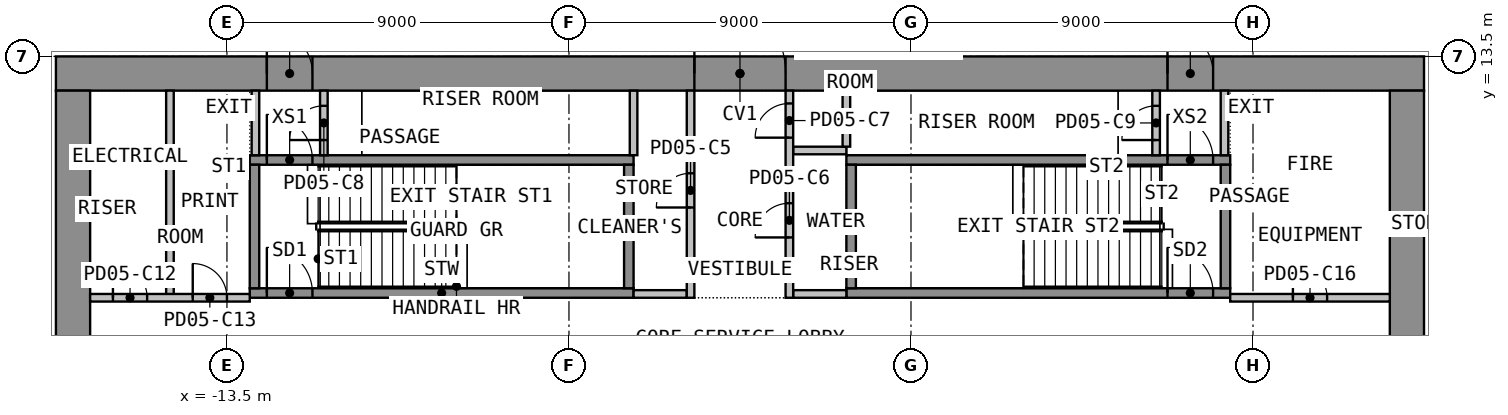
"""IFC4 building model, lengths in metres.
Left out: names, types, materials, properties, quantities, classifications, styles, units other than length and angle.
Written with IfcOpenShell. Run it as: python <this file> out.ifc"""

import sys

from ifc_helpers import new_model, si_unit, direction, frame, frame_2d, origin, place, context, subcontext, project, spatial, rectangle, extrude, element, fill, save


model = new_model("IFC4")
c1 = context("Model", 3, precision=1e-05, world=origin(), true_north=direction((0.0, 1.0)))
c2 = subcontext(c1, "Body", "Model", "MODEL_VIEW")
j1 = project(units=[si_unit("LENGTHUNIT", "METRE"), si_unit("PLANEANGLEUNIT", "RADIAN")], contexts=[c1])
p1 = place(None, origin())
s1 = spatial("IfcSite", under=j1, at=p1, CompositionType="ELEMENT")
p2 = place(p1, origin())
s2 = spatial("IfcBuilding", under=s1, at=p2, CompositionType="ELEMENT")
p3 = place(p2, frame((0.0, 0.0, 25.2)))
s3 = spatial("IfcBuildingStorey", under=s2, at=p3, CompositionType="ELEMENT", Elevation=25.2)
p4 = place(p3, frame((-18.0, 13.05, 0.0), z_axis=(0.0, 0.0, 1.0), x_axis=(1.0, 0.0, 0.0)))
e1 = element("IfcWall", 1, at=p4, inside=s3, PredefinedType="SHEAR", context=c2, shape_type="SweptSolid", body=[
    extrude(rectangle(XDim=36.0, YDim=0.9, at=frame_2d((18.0, 0.0))), origin(), (0.0, 0.0, 1.0), 4.425),
])
p5 = place(p4, frame((16.8, 0.0, 0.0)))
e2 = element("IfcOpeningElement", 2, at=p5, cuts=e1, PredefinedType="OPENING", context=c2, shape_type="SweptSolid", body=[
    extrude(rectangle(XDim=2.4, YDim=2.1, at=frame_2d((1.2, 1.05))), frame((0.0, 0.46, 0.0), z_axis=(0.0, -1.0, 0.0), x_axis=(1.0, 0.0, 0.0)), (0.0, 0.0, 1.0), 0.92),
])
p6 = place(p4, frame((5.55, 0.0, 0.0)))
e3 = element("IfcOpeningElement", 3, at=p6, cuts=e1, PredefinedType="OPENING", context=c2, shape_type="SweptSolid", body=[
    extrude(rectangle(XDim=1.2, YDim=2.1, at=frame_2d((0.6, 1.05))), frame((0.0, 0.46, 0.0), z_axis=(0.0, -1.0, 0.0), x_axis=(1.0, 0.0, 0.0)), (0.0, 0.0, 1.0), 0.92),
])
p7 = place(p4, frame((29.25, 0.0, 0.0)))
e4 = element("IfcOpeningElement", 4, at=p7, cuts=e1, PredefinedType="OPENING", context=c2, shape_type="SweptSolid", body=[
    extrude(rectangle(XDim=1.2, YDim=2.1, at=frame_2d((0.6, 1.05))), frame((0.0, 0.46, 0.0), z_axis=(0.0, -1.0, 0.0), x_axis=(1.0, 0.0, 0.0)), (0.0, 0.0, 1.0), 0.92),
])
p8 = place(p3, frame((-17.55, -12.6, 0.0), z_axis=(0.0, 0.0, 1.0), x_axis=(0.0, 1.0, 0.0)))
e5 = element("IfcWall", 5, at=p8, inside=s3, PredefinedType="SHEAR", context=c2, shape_type="SweptSolid", body=[
    extrude(rectangle(XDim=25.2, YDim=0.9, at=frame_2d((12.6, 0.0))), origin(), (0.0, 0.0, 1.0), 4.425),
])
p9 = place(p8, frame((11.4, 0.0, 0.0)))
e6 = element("IfcOpeningElement", 6, at=p9, cuts=e5, PredefinedType="OPENING", context=c2, shape_type="SweptSolid", body=[
    extrude(rectangle(XDim=2.4, YDim=2.1, at=frame_2d((1.2, 1.05))), frame((0.0, 0.46, 0.0), z_axis=(0.0, -1.0, 0.0), x_axis=(1.0, 0.0, 0.0)), (0.0, 0.0, 1.0), 0.92),
])
p10 = place(p3, frame((17.55, -12.6, 0.0), z_axis=(0.0, 0.0, 1.0), x_axis=(0.0, 1.0, 0.0)))
e7 = element("IfcWall", 7, at=p10, inside=s3, PredefinedType="SHEAR", context=c2, shape_type="SweptSolid", body=[
    extrude(rectangle(XDim=25.2, YDim=0.9, at=frame_2d((12.6, 0.0))), origin(), (0.0, 0.0, 1.0), 4.425),
])
p11 = place(p10, frame((11.4, 0.0, 0.0)))
e8 = element("IfcOpeningElement", 8, at=p11, cuts=e7, PredefinedType="OPENING", context=c2, shape_type="SweptSolid", body=[
    extrude(rectangle(XDim=2.4, YDim=2.1, at=frame_2d((1.2, 1.05))), frame((0.0, 0.46, 0.0), z_axis=(0.0, -1.0, 0.0), x_axis=(1.0, 0.0, 0.0)), (0.0, 0.0, 1.0), 0.92),
])
p12 = place(p3, frame((-12.9, 7.275, 0.0), z_axis=(0.0, 0.0, 1.0), x_axis=(1.0, 0.0, 0.0)))
e9 = element("IfcWall", 9, at=p12, inside=s3, PredefinedType="SHEAR", context=c2, shape_type="SweptSolid", body=[
    extrude(rectangle(XDim=10.1, YDim=0.25, at=frame_2d((5.05, 0.0))), origin(), (0.0, 0.0, 1.0), 4.425),
])
p13 = place(p12, frame((0.45, 0.0, 0.0)))
e10 = element("IfcOpeningElement", 10, at=p13, cuts=e9, PredefinedType="OPENING", context=c2, shape_type="SweptSolid", body=[
    extrude(rectangle(XDim=1.2, YDim=2.1, at=frame_2d((0.6, 1.05))), frame((0.0, 0.135, 0.0), z_axis=(0.0, -1.0, 0.0), x_axis=(1.0, 0.0, 0.0)), (0.0, 0.0, 1.0), 0.27),
])
p14 = place(p3, frame((-12.9, 10.775, 0.0), z_axis=(0.0, 0.0, 1.0), x_axis=(1.0, 0.0, 0.0)))
e11 = element("IfcWall", 11, at=p14, inside=s3, PredefinedType="SHEAR", context=c2, shape_type="SweptSolid", body=[
    extrude(rectangle(XDim=10.1, YDim=0.25, at=frame_2d((5.05, 0.0))), origin(), (0.0, 0.0, 1.0), 4.425),
])
p15 = place(p14, frame((0.45, 0.0, 0.0)))
e12 = element("IfcOpeningElement", 12, at=p15, cuts=e11, PredefinedType="OPENING", context=c2, shape_type="SweptSolid", body=[
    extrude(rectangle(XDim=1.2, YDim=2.1, at=frame_2d((0.6, 1.05))), frame((0.0, 0.135, 0.0), z_axis=(0.0, -1.0, 0.0), x_axis=(1.0, 0.0, 0.0)), (0.0, 0.0, 1.0), 0.27),
])
for number, where, z_axis, x_axis in (
    (13, (-12.775, 7.4, 0.0), (0.0, 0.0, 1.0), (0.0, 1.0, 0.0)),
    (14, (-2.925, 7.4, 0.0), (0.0, 0.0, 1.0), (0.0, 1.0, 0.0)),
):
    element("IfcWall", number, at=place(p3, frame(where, z_axis=z_axis, x_axis=x_axis)), inside=s3, PredefinedType="SHEAR", context=c2, shape_type="SweptSolid", body=[
        extrude(rectangle(XDim=3.25, YDim=0.25, at=frame_2d((1.625, 0.0))), origin(), (0.0, 0.0, 1.0), 4.425),
    ])
p16 = place(p3, frame((2.8, 7.275, 0.0), z_axis=(0.0, 0.0, 1.0), x_axis=(1.0, 0.0, 0.0)))
e15 = element("IfcWall", 15, at=p16, inside=s3, PredefinedType="SHEAR", context=c2, shape_type="SweptSolid", body=[
    extrude(rectangle(XDim=10.1, YDim=0.25, at=frame_2d((5.05, 0.0))), origin(), (0.0, 0.0, 1.0), 4.425),
])
p17 = place(p16, frame((8.45, 0.0, 0.0)))
e16 = element("IfcOpeningElement", 16, at=p17, cuts=e15, PredefinedType="OPENING", context=c2, shape_type="SweptSolid", body=[
    extrude(rectangle(XDim=1.2, YDim=2.1, at=frame_2d((0.6, 1.05))), frame((0.0, 0.135, 0.0), z_axis=(0.0, -1.0, 0.0), x_axis=(1.0, 0.0, 0.0)), (0.0, 0.0, 1.0), 0.27),
])
p18 = place(p3, frame((2.8, 10.775, 0.0), z_axis=(0.0, 0.0, 1.0), x_axis=(1.0, 0.0, 0.0)))
e17 = element("IfcWall", 17, at=p18, inside=s3, PredefinedType="SHEAR", context=c2, shape_type="SweptSolid", body=[
    extrude(rectangle(XDim=10.1, YDim=0.25, at=frame_2d((5.05, 0.0))), origin(), (0.0, 0.0, 1.0), 4.425),
])
p19 = place(p18, frame((8.45, 0.0, 0.0)))
e18 = element("IfcOpeningElement", 18, at=p19, cuts=e17, PredefinedType="OPENING", context=c2, shape_type="SweptSolid", body=[
    extrude(rectangle(XDim=1.2, YDim=2.1, at=frame_2d((0.6, 1.05))), frame((0.0, 0.135, 0.0), z_axis=(0.0, -1.0, 0.0), x_axis=(1.0, 0.0, 0.0)), (0.0, 0.0, 1.0), 0.27),
])
for number, where, z_axis, x_axis in (
    (19, (2.925, 7.4, 0.0), (0.0, 0.0, 1.0), (0.0, 1.0, 0.0)),
    (20, (12.775, 7.4, 0.0), (0.0, 0.0, 1.0), (0.0, 1.0, 0.0)),
):
    element("IfcWall", number, at=place(p3, frame(where, z_axis=z_axis, x_axis=x_axis)), inside=s3, PredefinedType="SHEAR", context=c2, shape_type="SweptSolid", body=[
        extrude(rectangle(XDim=3.25, YDim=0.25, at=frame_2d((1.625, 0.0))), origin(), (0.0, 0.0, 1.0), 4.425),
    ])
for number, where, z_axis, x_axis in (
    (21, (-2.8, 7.25, 0.0), (0.0, 0.0, 1.0), (1.0, 0.0, 0.0)),
    (22, (1.4, 7.25, 0.0), (0.0, 0.0, 1.0), (1.0, 0.0, 0.0)),
    (23, (1.4, 11.025, 0.0), (0.0, 0.0, 1.0), (1.0, 0.0, 0.0)),
):
    element("IfcWall", number, at=place(p3, frame(where, z_axis=z_axis, x_axis=x_axis)), inside=s3, PredefinedType="PARTITIONING", context=c2, shape_type="SweptSolid", body=[
        extrude(rectangle(XDim=1.4, YDim=0.2, at=frame_2d((0.7, 0.0))), origin(), (0.0, 0.0, 1.0), 4.425),
    ])
p20 = place(p3, frame((-1.3, 7.15, 0.0), z_axis=(0.0, 0.0, 1.0), x_axis=(0.0, 1.0, 0.0)))
e24 = element("IfcWall", 24, at=p20, inside=s3, PredefinedType="PARTITIONING", context=c2, shape_type="SweptSolid", body=[
    extrude(rectangle(XDim=5.45, YDim=0.2, at=frame_2d((2.725, 0.0))), origin(), (0.0, 0.0, 1.0), 4.425),
])
p21 = place(p20, frame((2.375, 0.0, 0.0)))
e25 = element("IfcOpeningElement", 25, at=p21, cuts=e24, PredefinedType="OPENING", context=c2, shape_type="SweptSolid", body=[
    extrude(rectangle(XDim=0.9, YDim=2.1, at=frame_2d((0.45, 1.05))), frame((0.0, 0.11, 0.0), z_axis=(0.0, -1.0, 0.0), x_axis=(1.0, 0.0, 0.0)), (0.0, 0.0, 1.0), 0.22),
])
p22 = place(p3, frame((1.3, 7.15, 0.0), z_axis=(0.0, 0.0, 1.0), x_axis=(0.0, 1.0, 0.0)))
e26 = element("IfcWall", 26, at=p22, inside=s3, PredefinedType="PARTITIONING", context=c2, shape_type="SweptSolid", body=[
    extrude(rectangle(XDim=5.45, YDim=0.2, at=frame_2d((2.725, 0.0))), origin(), (0.0, 0.0, 1.0), 4.425),
])
p23 = place(p22, frame((1.587, 0.0, 0.0)))
e27 = element("IfcOpeningElement", 27, at=p23, cuts=e26, PredefinedType="OPENING", context=c2, shape_type="SweptSolid", body=[
    extrude(rectangle(XDim=0.9, YDim=2.1, at=frame_2d((0.45, 1.05))), frame((0.0, 0.11, 0.0), z_axis=(0.0, -1.0, 0.0), x_axis=(1.0, 0.0, 0.0)), (0.0, 0.0, 1.0), 0.22),
])
p24 = place(p22, frame((4.212, 0.0, 0.0)))
e28 = element("IfcOpeningElement", 28, at=p24, cuts=e26, PredefinedType="OPENING", context=c2, shape_type="SweptSolid", body=[
    extrude(rectangle(XDim=0.9, YDim=2.1, at=frame_2d((0.45, 1.05))), frame((0.0, 0.11, 0.0), z_axis=(0.0, -1.0, 0.0), x_axis=(1.0, 0.0, 0.0)), (0.0, 0.0, 1.0), 0.22),
])
p25 = place(p3, frame((-12.75, 10.9, 0.0), z_axis=(0.0, 0.0, 1.0), x_axis=(0.0, 1.0, 0.0)))
e29 = element("IfcWall", 29, at=p25, inside=s3, PredefinedType="PARTITIONING", context=c2, shape_type="SweptSolid", body=[
    extrude(rectangle(XDim=1.7, YDim=0.2, at=frame_2d((0.85, 0.0))), origin(), (0.0, 0.0, 1.0), 4.425),
])
p26 = place(p3, frame((-10.95, 10.9, 0.0), z_axis=(0.0, 0.0, 1.0), x_axis=(0.0, 1.0, 0.0)))
e30 = element("IfcWall", 30, at=p26, inside=s3, PredefinedType="PARTITIONING", context=c2, shape_type="SweptSolid", body=[
    extrude(rectangle(XDim=1.7, YDim=0.2, at=frame_2d((0.85, 0.0))), origin(), (0.0, 0.0, 1.0), 4.425),
])
p27 = place(p26, frame((0.4, 0.0, 0.0)))
e31 = element("IfcOpeningElement", 31, at=p27, cuts=e30, PredefinedType="OPENING", context=c2, shape_type="SweptSolid", body=[
    extrude(rectangle(XDim=0.9, YDim=2.1, at=frame_2d((0.45, 1.05))), frame((0.0, 0.11, 0.0), z_axis=(0.0, -1.0, 0.0), x_axis=(1.0, 0.0, 0.0)), (0.0, 0.0, 1.0), 0.22),
])
p28 = place(p3, frame((12.75, 10.9, 0.0), z_axis=(0.0, 0.0, 1.0), x_axis=(0.0, 1.0, 0.0)))
e32 = element("IfcWall", 32, at=p28, inside=s3, PredefinedType="PARTITIONING", context=c2, shape_type="SweptSolid", body=[
    extrude(rectangle(XDim=1.7, YDim=0.2, at=frame_2d((0.85, 0.0))), origin(), (0.0, 0.0, 1.0), 4.425),
])
p29 = place(p3, frame((10.95, 10.9, 0.0), z_axis=(0.0, 0.0, 1.0), x_axis=(0.0, 1.0, 0.0)))
e33 = element("IfcWall", 33, at=p29, inside=s3, PredefinedType="PARTITIONING", context=c2, shape_type="SweptSolid", body=[
    extrude(rectangle(XDim=1.7, YDim=0.2, at=frame_2d((0.85, 0.0))), origin(), (0.0, 0.0, 1.0), 4.425),
])
p30 = place(p29, frame((0.4, 0.0, 0.0)))
e34 = element("IfcOpeningElement", 34, at=p30, cuts=e33, PredefinedType="OPENING", context=c2, shape_type="SweptSolid", body=[
    extrude(rectangle(XDim=0.9, YDim=2.1, at=frame_2d((0.45, 1.05))), frame((0.0, 0.11, 0.0), z_axis=(0.0, -1.0, 0.0), x_axis=(1.0, 0.0, 0.0)), (0.0, 0.0, 1.0), 0.22),
])
p31 = place(p3, frame((-15.0, 7.15, 0.0), z_axis=(0.0, 0.0, 1.0), x_axis=(0.0, 1.0, 0.0)))
e35 = element("IfcWall", 35, at=p31, inside=s3, PredefinedType="PARTITIONING", context=c2, shape_type="SweptSolid", body=[
    extrude(rectangle(XDim=5.45, YDim=0.2, at=frame_2d((2.725, 0.0))), origin(), (0.0, 0.0, 1.0), 4.425),
])
p32 = place(p3, frame((-17.1, 7.15, 0.0), z_axis=(0.0, 0.0, 1.0), x_axis=(1.0, 0.0, 0.0)))
e36 = element("IfcWall", 36, at=p32, inside=s3, PredefinedType="PARTITIONING", context=c2, shape_type="SweptSolid", body=[
    extrude(rectangle(XDim=4.2, YDim=0.2, at=frame_2d((2.1, 0.0))), origin(), (0.0, 0.0, 1.0), 4.425),
])
p33 = place(p32, frame((0.6, 0.0, 0.0)))
e37 = element("IfcOpeningElement", 37, at=p33, cuts=e36, PredefinedType="OPENING", context=c2, shape_type="SweptSolid", body=[
    extrude(rectangle(XDim=0.9, YDim=2.1, at=frame_2d((0.45, 1.05))), frame((0.0, 0.11, 0.0), z_axis=(0.0, -1.0, 0.0), x_axis=(1.0, 0.0, 0.0)), (0.0, 0.0, 1.0), 0.22),
])
p34 = place(p32, frame((2.7, 0.0, 0.0)))
e38 = element("IfcOpeningElement", 38, at=p34, cuts=e36, PredefinedType="OPENING", context=c2, shape_type="SweptSolid", body=[
    extrude(rectangle(XDim=0.9, YDim=2.1, at=frame_2d((0.45, 1.05))), frame((0.0, 0.11, 0.0), z_axis=(0.0, -1.0, 0.0), x_axis=(1.0, 0.0, 0.0)), (0.0, 0.0, 1.0), 0.22),
])
p35 = place(p3, frame((12.9, 7.15, 0.0), z_axis=(0.0, 0.0, 1.0), x_axis=(1.0, 0.0, 0.0)))
e39 = element("IfcWall", 39, at=p35, inside=s3, PredefinedType="PARTITIONING", context=c2, shape_type="SweptSolid", body=[
    extrude(rectangle(XDim=4.2, YDim=0.2, at=frame_2d((2.1, 0.0))), origin(), (0.0, 0.0, 1.0), 4.425),
])
p36 = place(p35, frame((1.65, 0.0, 0.0)))
e40 = element("IfcOpeningElement", 40, at=p36, cuts=e39, PredefinedType="OPENING", context=c2, shape_type="SweptSolid", body=[
    extrude(rectangle(XDim=0.9, YDim=2.1, at=frame_2d((0.45, 1.05))), frame((0.0, 0.11, 0.0), z_axis=(0.0, -1.0, 0.0), x_axis=(1.0, 0.0, 0.0)), (0.0, 0.0, 1.0), 0.22),
])
p37 = place(p3, frame((-2.8, 10.901, 0.0), z_axis=(0.0, 0.0, 1.0), x_axis=(0.0, 1.0, 0.0)))
e41 = element("IfcWall", 41, at=p37, inside=s3, PredefinedType="PARTITIONING", context=c2, shape_type="SweptSolid", body=[
    extrude(rectangle(XDim=1.698, YDim=0.2, at=frame_2d((0.849, 0.0))), origin(), (0.0, 0.0, 1.0), 4.425),
])
p38 = place(p3, frame((2.8, 12.599, 0.0), z_axis=(0.0, 0.0, 1.0), x_axis=(0.0, -1.0, 0.0)))
e42 = element("IfcWall", 42, at=p38, inside=s3, PredefinedType="PARTITIONING", context=c2, shape_type="SweptSolid", body=[
    extrude(rectangle(XDim=1.473, YDim=0.2, at=frame_2d((0.737, 0.0))), origin(), (0.0, 0.0, 1.0), 4.425),
])
p39 = place(p5, origin())
e43 = element("IfcDoor", 43, at=p39, inside=s3, OperationType="DOUBLE_DOOR_DOUBLE_SWING", PredefinedType="DOOR", context=c2, shape_type="SweptSolid", body=[
    extrude(rectangle(XDim=2.4, YDim=2.1, at=frame_2d((1.2, 1.05))), frame((0.0, 0.025, 0.0), z_axis=(0.0, -1.0, 0.0), x_axis=(1.0, 0.0, 0.0)), (0.0, 0.0, 1.0), 0.05),
])
fill(e2, e43)
p40 = place(p6, origin())
e44 = element("IfcDoor", 44, at=p40, inside=s3, OperationType="SINGLE_SWING_RIGHT", PredefinedType="DOOR", context=c2, shape_type="SweptSolid", body=[
    extrude(rectangle(XDim=1.2, YDim=2.1, at=frame_2d((0.6, 1.05))), frame((0.0, 0.025, 0.0), z_axis=(0.0, -1.0, 0.0), x_axis=(1.0, 0.0, 0.0)), (0.0, 0.0, 1.0), 0.05),
])
fill(e3, e44)
p41 = place(p7, origin())
e45 = element("IfcDoor", 45, at=p41, inside=s3, OperationType="SINGLE_SWING_RIGHT", PredefinedType="DOOR", context=c2, shape_type="SweptSolid", body=[
    extrude(rectangle(XDim=1.2, YDim=2.1, at=frame_2d((0.6, 1.05))), frame((0.0, 0.025, 0.0), z_axis=(0.0, -1.0, 0.0), x_axis=(1.0, 0.0, 0.0)), (0.0, 0.0, 1.0), 0.05),
])
fill(e4, e45)
p42 = place(p13, origin())
e46 = element("IfcDoor", 46, at=p42, inside=s3, OperationType="SINGLE_SWING_LEFT", PredefinedType="DOOR", context=c2, shape_type="SweptSolid", body=[
    extrude(rectangle(XDim=1.2, YDim=2.1, at=frame_2d((0.6, 1.05))), frame((0.0, 0.025, 0.0), z_axis=(0.0, -1.0, 0.0), x_axis=(1.0, 0.0, 0.0)), (0.0, 0.0, 1.0), 0.05),
])
fill(e10, e46)
p43 = place(p17, origin())
e47 = element("IfcDoor", 47, at=p43, inside=s3, OperationType="SINGLE_SWING_LEFT", PredefinedType="DOOR", context=c2, shape_type="SweptSolid", body=[
    extrude(rectangle(XDim=1.2, YDim=2.1, at=frame_2d((0.6, 1.05))), frame((0.0, 0.025, 0.0), z_axis=(0.0, -1.0, 0.0), x_axis=(1.0, 0.0, 0.0)), (0.0, 0.0, 1.0), 0.05),
])
fill(e16, e47)
p44 = place(p21, origin())
e48 = element("IfcDoor", 48, at=p44, inside=s3, OperationType="SINGLE_SWING_LEFT", PredefinedType="DOOR", context=c2, shape_type="SweptSolid", body=[
    extrude(rectangle(XDim=0.9, YDim=2.1, at=frame_2d((0.45, 1.05))), frame((0.0, 0.025, 0.0), z_axis=(0.0, -1.0, 0.0), x_axis=(1.0, 0.0, 0.0)), (0.0, 0.0, 1.0), 0.05),
])
fill(e25, e48)
p45 = place(p23, origin())
e49 = element("IfcDoor", 49, at=p45, inside=s3, OperationType="SINGLE_SWING_LEFT", PredefinedType="DOOR", context=c2, shape_type="SweptSolid", body=[
    extrude(rectangle(XDim=0.9, YDim=2.1, at=frame_2d((0.45, 1.05))), frame((0.0, 0.025, 0.0), z_axis=(0.0, -1.0, 0.0), x_axis=(1.0, 0.0, 0.0)), (0.0, 0.0, 1.0), 0.05),
])
fill(e27, e49)
p46 = place(p24, origin())
e50 = element("IfcDoor", 50, at=p46, inside=s3, OperationType="SINGLE_SWING_LEFT", PredefinedType="DOOR", context=c2, shape_type="SweptSolid", body=[
    extrude(rectangle(XDim=0.9, YDim=2.1, at=frame_2d((0.45, 1.05))), frame((0.0, 0.025, 0.0), z_axis=(0.0, -1.0, 0.0), x_axis=(1.0, 0.0, 0.0)), (0.0, 0.0, 1.0), 0.05),
])
fill(e28, e50)
p47 = place(p15, origin())
e51 = element("IfcDoor", 51, at=p47, inside=s3, OperationType="SINGLE_SWING_RIGHT", PredefinedType="DOOR", context=c2, shape_type="SweptSolid", body=[
    extrude(rectangle(XDim=1.2, YDim=2.1, at=frame_2d((0.6, 1.05))), frame((0.0, 0.025, 0.0), z_axis=(0.0, -1.0, 0.0), x_axis=(1.0, 0.0, 0.0)), (0.0, 0.0, 1.0), 0.05),
])
fill(e12, e51)
p48 = place(p27, origin())
e52 = element("IfcDoor", 52, at=p48, inside=s3, OperationType="SINGLE_SWING_LEFT", PredefinedType="DOOR", context=c2, shape_type="SweptSolid", body=[
    extrude(rectangle(XDim=0.9, YDim=2.1, at=frame_2d((0.45, 1.05))), frame((0.0, 0.025, 0.0), z_axis=(0.0, -1.0, 0.0), x_axis=(1.0, 0.0, 0.0)), (0.0, 0.0, 1.0), 0.05),
])
fill(e31, e52)
p49 = place(p19, origin())
e53 = element("IfcDoor", 53, at=p49, inside=s3, OperationType="SINGLE_SWING_RIGHT", PredefinedType="DOOR", context=c2, shape_type="SweptSolid", body=[
    extrude(rectangle(XDim=1.2, YDim=2.1, at=frame_2d((0.6, 1.05))), frame((0.0, 0.025, 0.0), z_axis=(0.0, -1.0, 0.0), x_axis=(1.0, 0.0, 0.0)), (0.0, 0.0, 1.0), 0.05),
])
fill(e18, e53)
p50 = place(p30, origin())
e54 = element("IfcDoor", 54, at=p50, inside=s3, OperationType="SINGLE_SWING_LEFT", PredefinedType="DOOR", context=c2, shape_type="SweptSolid", body=[
    extrude(rectangle(XDim=0.9, YDim=2.1, at=frame_2d((0.45, 1.05))), frame((0.0, 0.025, 0.0), z_axis=(0.0, -1.0, 0.0), x_axis=(1.0, 0.0, 0.0)), (0.0, 0.0, 1.0), 0.05),
])
fill(e34, e54)
p51 = place(p33, origin())
e55 = element("IfcDoor", 55, at=p51, inside=s3, OperationType="SINGLE_SWING_LEFT", PredefinedType="DOOR", context=c2, shape_type="SweptSolid", body=[
    extrude(rectangle(XDim=0.9, YDim=2.1, at=frame_2d((0.45, 1.05))), frame((0.0, 0.025, 0.0), z_axis=(0.0, -1.0, 0.0), x_axis=(1.0, 0.0, 0.0)), (0.0, 0.0, 1.0), 0.05),
])
fill(e37, e55)
p52 = place(p34, origin())
e56 = element("IfcDoor", 56, at=p52, inside=s3, OperationType="SINGLE_SWING_LEFT", PredefinedType="DOOR", context=c2, shape_type="SweptSolid", body=[
    extrude(rectangle(XDim=0.9, YDim=2.1, at=frame_2d((0.45, 1.05))), frame((0.0, 0.025, 0.0), z_axis=(0.0, -1.0, 0.0), x_axis=(1.0, 0.0, 0.0)), (0.0, 0.0, 1.0), 0.05),
])
fill(e38, e56)
p53 = place(p36, origin())
e57 = element("IfcDoor", 57, at=p53, inside=s3, OperationType="SINGLE_SWING_LEFT", PredefinedType="DOOR", context=c2, shape_type="SweptSolid", body=[
    extrude(rectangle(XDim=0.9, YDim=2.1, at=frame_2d((0.45, 1.05))), frame((0.0, 0.025, 0.0), z_axis=(0.0, -1.0, 0.0), x_axis=(1.0, 0.0, 0.0)), (0.0, 0.0, 1.0), 0.05),
])
fill(e40, e57)
save(model, sys.argv[1])
